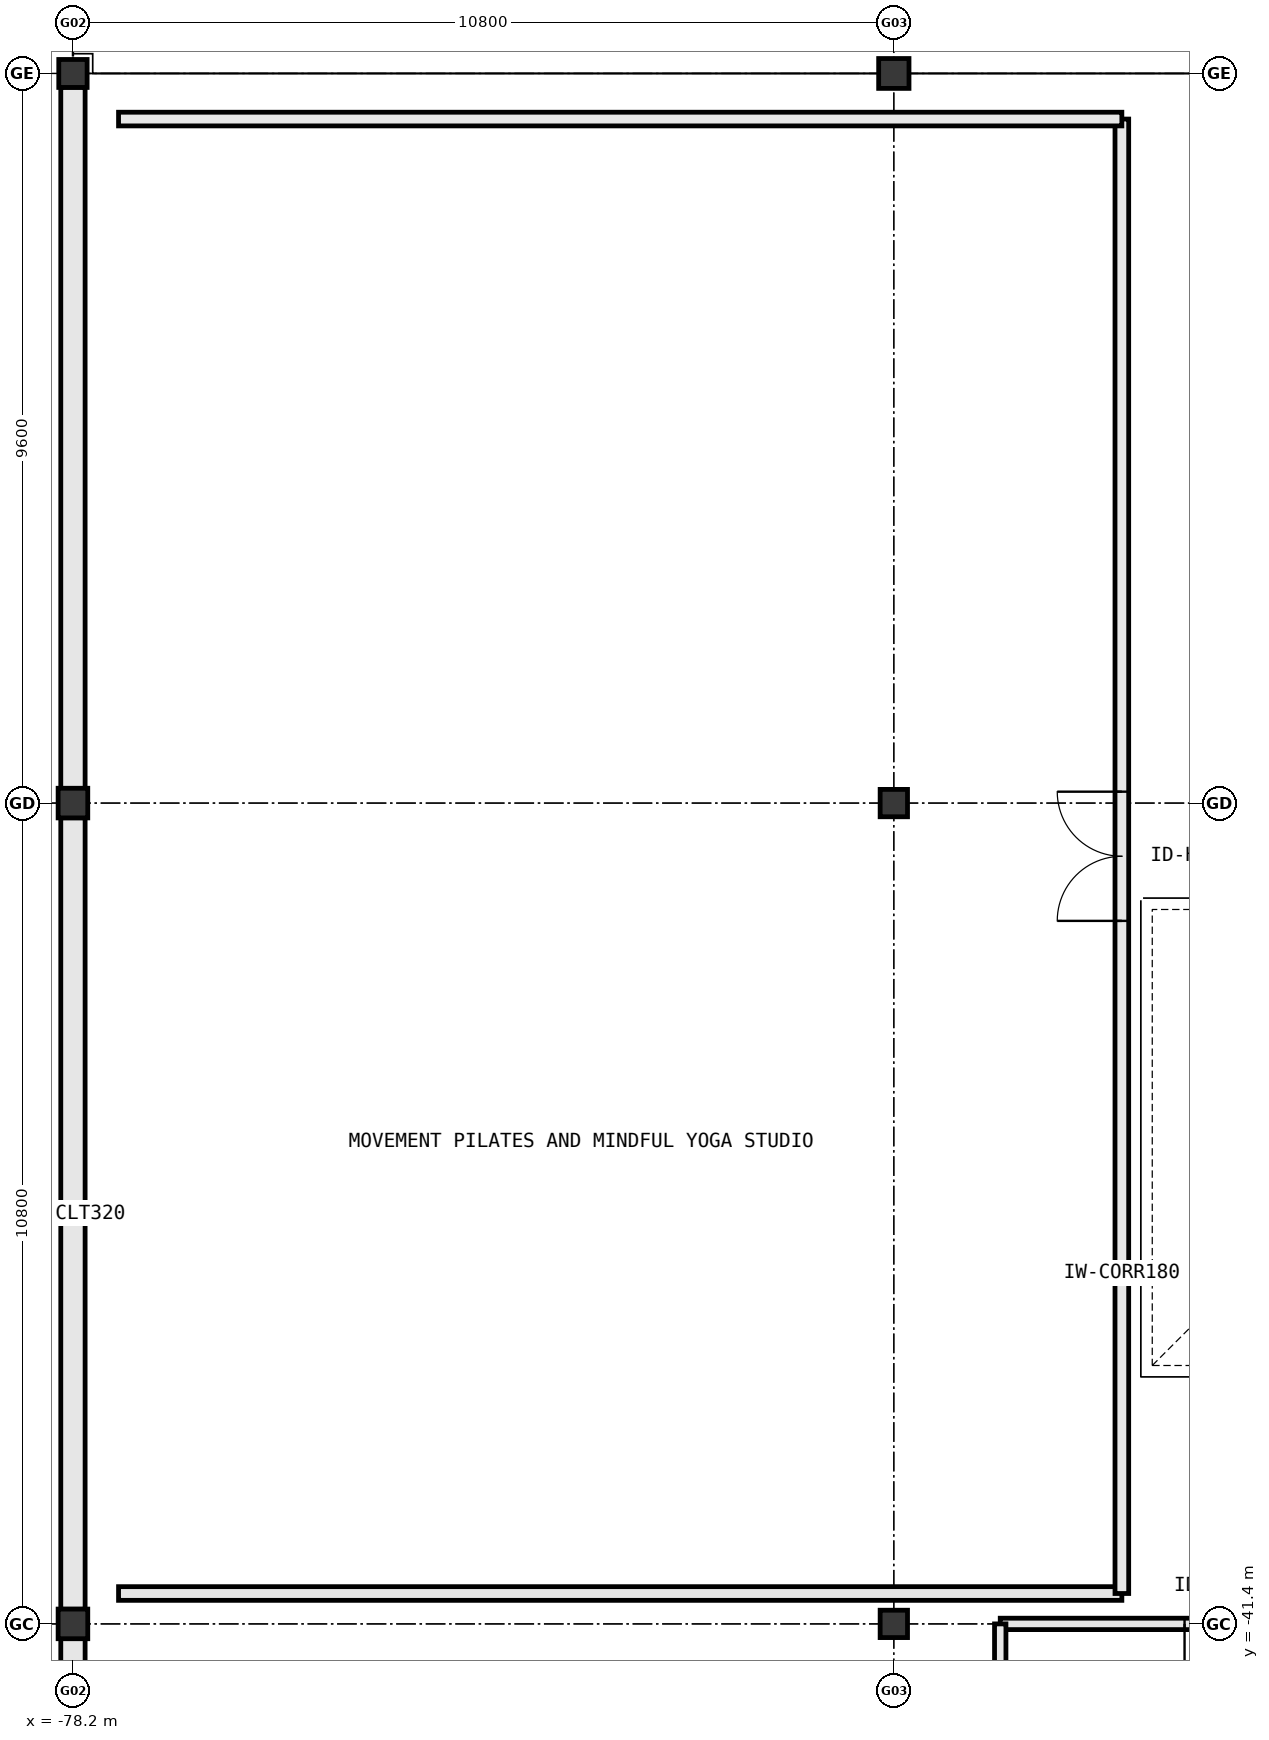
"""IFC4 building model, lengths in metres.
Left out: names, types, materials, properties, quantities, classifications, styles, units other than length and angle.
Written with IfcOpenShell. Run it as: python <this file> out.ifc"""

import sys

from ifc_helpers import new_model, si_unit, direction, frame, frame_2d, origin, origin_2d, place, context, subcontext, project, spatial, rectangle, i_section, extrude, element, fill, save


model = new_model("IFC4")
c1 = context("Model", 3, precision=1e-05, world=origin(), true_north=direction((0.0, 1.0)))
c2 = subcontext(c1, "Body", "Model", "MODEL_VIEW")
j1 = project(units=[si_unit("LENGTHUNIT", "METRE"), si_unit("PLANEANGLEUNIT", "RADIAN")], contexts=[c1])
p1 = place(None, origin())
s1 = spatial("IfcSite", under=j1, at=p1, CompositionType="ELEMENT")
p2 = place(p1, origin())
s2 = spatial("IfcBuilding", under=s1, at=p2, CompositionType="ELEMENT")
p3 = place(p2, frame((0.0, 0.0, 10.8)))
s3 = spatial("IfcBuildingStorey", under=s2, at=p3, CompositionType="ELEMENT", Elevation=10.8)
p4 = place(p3, frame((-78.2, -21.0, 0.0), z_axis=(0.0, 0.0, 1.0), x_axis=(1.0, 0.0, 0.0)))
e1 = element("IfcColumn", 1, at=p4, inside=s3, PredefinedType="COLUMN", context=c2, shape_type="SweptSolid", body=[
    extrude(i_section(OverallWidth=0.373, OverallDepth=0.368, WebThickness=0.015, FlangeThickness=0.024, at=origin_2d()), origin(), (0.0, 0.0, 1.0), 5.4),
])
p5 = place(p3, frame((-67.4, -21.0, 0.0), z_axis=(0.0, 0.0, 1.0), x_axis=(1.0, 0.0, 0.0)))
e2 = element("IfcColumn", 2, at=p5, inside=s3, PredefinedType="COLUMN", context=c2, shape_type="SweptSolid", body=[
    extrude(i_section(OverallWidth=0.399, OverallDepth=0.393, WebThickness=0.023, FlangeThickness=0.037, at=origin_2d()), origin(), (0.0, 0.0, 1.0), 5.4),
])
for number, where, z_axis, x_axis in (
    (3, (-78.2, -41.4, 0.0), (0.0, 0.0, 1.0), (1.0, 0.0, 0.0)),
    (4, (-78.2, -30.6, 0.0), (0.0, 0.0, 1.0), (1.0, 0.0, 0.0)),
):
    element("IfcColumn", number, at=place(p3, frame(where, z_axis=z_axis, x_axis=x_axis)), inside=s3, PredefinedType="COLUMN", context=c2, shape_type="SweptSolid", body=[
        extrude(rectangle(XDim=0.39, YDim=0.39, at=origin_2d()), origin(), (0.0, 0.0, 1.0), 5.4),
    ])
for number, where, z_axis, x_axis in (
    (5, (-67.4, -41.4, 0.0), (0.0, 0.0, 1.0), (1.0, 0.0, 0.0)),
    (6, (-67.4, -30.6, 0.0), (0.0, 0.0, 1.0), (1.0, 0.0, 0.0)),
):
    element("IfcColumn", number, at=place(p3, frame(where, z_axis=z_axis, x_axis=x_axis)), inside=s3, PredefinedType="COLUMN", context=c2, shape_type="SweptSolid", body=[
        extrude(rectangle(XDim=0.36, YDim=0.36, at=origin_2d()), origin(), (0.0, 0.0, 1.0), 5.4),
    ])
p6 = place(p3, frame((-78.2, -21.182, 0.0), z_axis=(0.0, 0.0, 1.0), x_axis=(0.0, -1.0, 0.0)))
e7 = element("IfcWall", 7, at=p6, inside=s3, PredefinedType="STANDARD", context=c2, shape_type="SweptSolid", body=[
    extrude(rectangle(XDim=9.225, YDim=0.32, at=frame_2d((4.613, 0.0))), origin(), (0.0, 0.0, 1.0), 4.099),
])
for number, where, z_axis, x_axis in (
    (8, (-78.2, -30.793, 0.0), (0.0, 0.0, 1.0), (0.0, -1.0, 0.0)),
    (9, (-78.2, -41.593, 0.0), (0.0, 0.0, 1.0), (0.0, -1.0, 0.0)),
):
    element("IfcWall", number, at=place(p3, frame(where, z_axis=z_axis, x_axis=x_axis)), inside=s3, PredefinedType="STANDARD", context=c2, shape_type="SweptSolid", body=[
        extrude(rectangle(XDim=10.414, YDim=0.32, at=frame_2d((5.207, 0.0))), origin(), (0.0, 0.0, 1.0), 4.099),
    ])
p7 = place(p3, frame((-77.6, -41.0, 0.0), z_axis=(0.0, 0.0, 1.0), x_axis=(1.0, 0.0, 0.0)))
e10 = element("IfcWall", 10, at=p7, inside=s3, PredefinedType="PARTITIONING", context=c2, shape_type="SweptSolid", body=[
    extrude(rectangle(XDim=13.2, YDim=0.18, at=frame_2d((6.6, 0.0))), origin(), (0.0, 0.0, 1.0), 4.016),
])
p8 = place(p3, frame((-64.4, -41.0, 0.0), z_axis=(0.0, 0.0, 1.0), x_axis=(0.0, 1.0, 0.0)))
e11 = element("IfcWall", 11, at=p8, inside=s3, PredefinedType="PARTITIONING", context=c2, shape_type="SweptSolid", body=[
    extrude(rectangle(XDim=19.4, YDim=0.18, at=frame_2d((9.7, 0.0))), origin(), (0.0, 0.0, 1.0), 4.8),
])
p9 = place(p8, frame((8.85, 0.0, 0.0)))
e12 = element("IfcOpeningElement", 12, at=p9, cuts=e11, PredefinedType="OPENING", context=c2, shape_type="SweptSolid", body=[
    extrude(rectangle(XDim=1.7, YDim=2.3, at=frame_2d((0.85, 1.15))), frame((0.0, 0.102, 0.0), z_axis=(0.0, -1.0, 0.0), x_axis=(1.0, 0.0, 0.0)), (0.0, 0.0, 1.0), 0.204),
])
p10 = place(p3, frame((-64.4, -21.6, 0.0), z_axis=(0.0, 0.0, 1.0), x_axis=(-1.0, 0.0, 0.0)))
e13 = element("IfcWall", 13, at=p10, inside=s3, PredefinedType="PARTITIONING", context=c2, shape_type="SweptSolid", body=[
    extrude(rectangle(XDim=13.2, YDim=0.18, at=frame_2d((6.6, 0.0))), origin(), (0.0, 0.0, 1.0), 4.8),
])
p11 = place(p3, frame((-60.2, -41.4, 0.0), z_axis=(0.0, 0.0, 1.0), x_axis=(-1.0, 0.0, 0.0)))
e14 = element("IfcWall", 14, at=p11, inside=s3, PredefinedType="PLUMBINGWALL", context=c2, shape_type="SweptSolid", body=[
    extrude(rectangle(XDim=5.8, YDim=0.15, at=frame_2d((2.9, 0.0))), origin(), (0.0, 0.0, 1.0), 4.016),
])
p12 = place(p11, frame((2.425, 0.0, 0.0)))
e15 = element("IfcOpeningElement", 15, at=p12, cuts=e14, PredefinedType="OPENING", context=c2, shape_type="SweptSolid", body=[
    extrude(rectangle(XDim=0.95, YDim=2.15, at=frame_2d((0.475, 1.075))), frame((0.0, 0.087, 0.0), z_axis=(0.0, -1.0, 0.0), x_axis=(1.0, 0.0, 0.0)), (0.0, 0.0, 1.0), 0.174),
])
p13 = place(p3, frame((-66.0, -41.4, 0.0), z_axis=(0.0, 0.0, 1.0), x_axis=(0.0, -1.0, 0.0)))
e16 = element("IfcWall", 16, at=p13, inside=s3, PredefinedType="PLUMBINGWALL", context=c2, shape_type="SweptSolid", body=[
    extrude(rectangle(XDim=10.0, YDim=0.15, at=frame_2d((5.0, 0.0))), origin(), (0.0, 0.0, 1.0), 4.8),
])
p14 = place(p9, origin())
e17 = element("IfcDoor", 17, at=p14, inside=s3, OperationType="DOUBLE_DOOR_SINGLE_SWING", PredefinedType="DOOR", context=c2, shape_type="SweptSolid", body=[
    extrude(rectangle(XDim=1.7, YDim=2.3, at=frame_2d((0.85, 1.15))), frame((0.0, 0.025, 0.0), z_axis=(0.0, -1.0, 0.0), x_axis=(1.0, 0.0, 0.0)), (0.0, 0.0, 1.0), 0.05),
])
fill(e12, e17)
p15 = place(p12, origin())
e18 = element("IfcDoor", 18, at=p15, inside=s3, OperationType="SINGLE_SWING_RIGHT", PredefinedType="DOOR", context=c2, shape_type="SweptSolid", body=[
    extrude(rectangle(XDim=0.95, YDim=2.15, at=frame_2d((0.475, 1.075))), frame((0.0, 0.025, 0.0), z_axis=(0.0, -1.0, 0.0), x_axis=(1.0, 0.0, 0.0)), (0.0, 0.0, 1.0), 0.05),
])
fill(e15, e18)
save(model, sys.argv[1])
